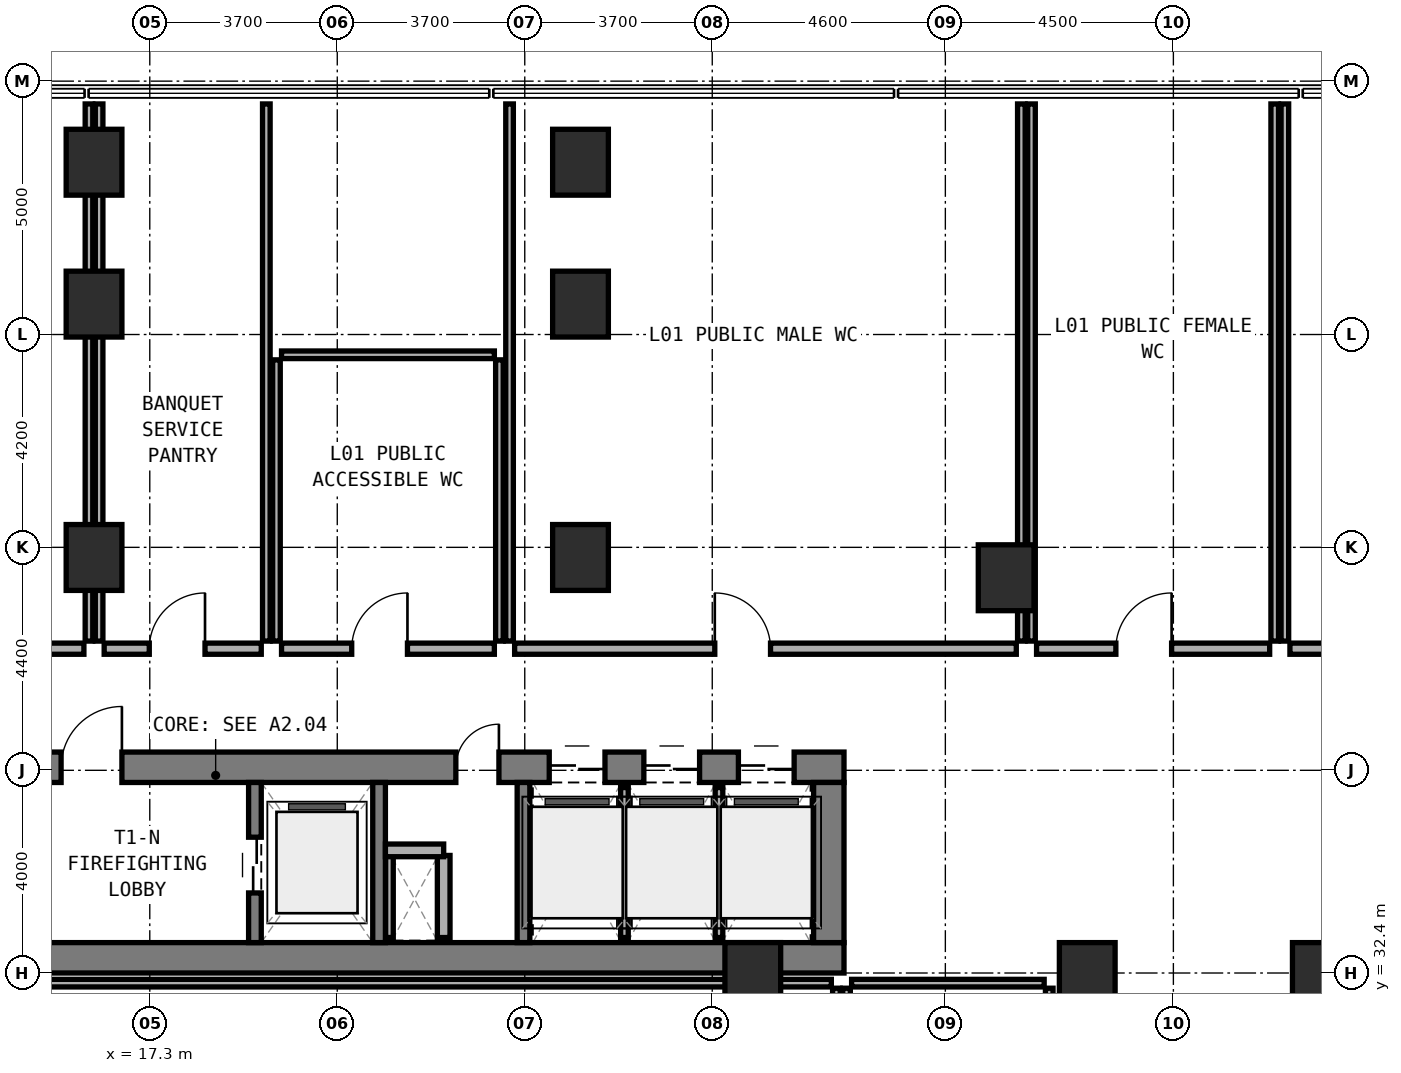
"""IFC4 building model, lengths in metres.
Left out: names, types, materials, properties, quantities, classifications, styles, units other than length and angle.
Written with IfcOpenShell. Run it as: python <this file> out.ifc"""

import sys

from ifc_helpers import new_model, si_unit, direction, frame, frame_2d, origin, origin_2d, place, context, subcontext, project, spatial, rectangle, extrude, element, fill, save


model = new_model("IFC4")
c1 = context("Model", 3, precision=1e-05, world=origin(), true_north=direction((0.0, 1.0)))
c2 = subcontext(c1, "Body", "Model", "MODEL_VIEW")
j1 = project(units=[si_unit("LENGTHUNIT", "METRE"), si_unit("PLANEANGLEUNIT", "RADIAN")], contexts=[c1])
p1 = place(None, origin())
s1 = spatial("IfcSite", under=j1, at=p1, CompositionType="ELEMENT")
p2 = place(p1, origin())
s2 = spatial("IfcBuilding", under=s1, at=p2, CompositionType="ELEMENT")
p3 = place(p2, frame((0.0, 0.0, 5.4)))
s3 = spatial("IfcBuildingStorey", under=s2, at=p3, CompositionType="ELEMENT", Elevation=5.4)
p4 = place(p3, frame((6.2, 32.7, 0.0), z_axis=(0.0, 0.0, 1.0), x_axis=(1.0, 0.0, 0.0)))
e1 = element("IfcWall", 1, at=p4, inside=s3, PredefinedType="SHEAR", context=c2, shape_type="SweptSolid", body=[
    extrude(rectangle(XDim=24.8, YDim=0.6, at=frame_2d((12.4, 0.0))), origin(), (0.0, 0.0, 1.0), 4.8),
])
p5 = place(p3, frame((6.2, 36.46, 0.0), z_axis=(0.0, 0.0, 1.0), x_axis=(1.0, 0.0, 0.0)))
e2 = element("IfcWall", 2, at=p5, inside=s3, PredefinedType="SHEAR", context=c2, shape_type="SweptSolid", body=[
    extrude(rectangle(XDim=24.8, YDim=0.6, at=frame_2d((12.4, 0.0))), origin(), (0.0, 0.0, 1.0), 4.8),
])
p6 = place(p5, frame((9.35, 0.0, 0.0)))
e3 = element("IfcOpeningElement", 3, at=p6, cuts=e2, PredefinedType="OPENING", context=c2, shape_type="SweptSolid", body=[
    extrude(rectangle(XDim=1.2, YDim=2.15, at=frame_2d((0.6, 1.075))), frame((0.0, 0.31, 0.0), z_axis=(0.0, -1.0, 0.0), x_axis=(1.0, 0.0, 0.0)), (0.0, 0.0, 1.0), 0.62),
])
p7 = place(p5, frame((17.14, 0.0, 0.0)))
e4 = element("IfcOpeningElement", 4, at=p7, cuts=e2, PredefinedType="OPENING", context=c2, shape_type="SweptSolid", body=[
    extrude(rectangle(XDim=0.85, YDim=2.1, at=frame_2d((0.425, 1.05))), frame((0.0, 0.31, 0.0), z_axis=(0.0, -1.0, 0.0), x_axis=(1.0, 0.0, 0.0)), (0.0, 0.0, 1.0), 0.62),
])
p8 = place(p5, frame((18.983, 0.0, 0.0)))
e5 = element("IfcOpeningElement", 5, at=p8, cuts=e2, PredefinedType="OPENING", context=c2, shape_type="SweptSolid", body=[
    extrude(rectangle(XDim=1.1, YDim=2.15, at=frame_2d((0.55, 1.075))), frame((0.0, 0.31, 0.0), z_axis=(0.0, -1.0, 0.0), x_axis=(1.0, 0.0, 0.0)), (0.0, 0.0, 1.0), 0.62),
])
p9 = place(p5, frame((20.85, 0.0, 0.0)))
e6 = element("IfcOpeningElement", 6, at=p9, cuts=e2, PredefinedType="OPENING", context=c2, shape_type="SweptSolid", body=[
    extrude(rectangle(XDim=1.1, YDim=2.15, at=frame_2d((0.55, 1.075))), frame((0.0, 0.31, 0.0), z_axis=(0.0, -1.0, 0.0), x_axis=(1.0, 0.0, 0.0)), (0.0, 0.0, 1.0), 0.62),
])
p10 = place(p5, frame((22.716, 0.0, 0.0)))
e7 = element("IfcOpeningElement", 7, at=p10, cuts=e2, PredefinedType="OPENING", context=c2, shape_type="SweptSolid", body=[
    extrude(rectangle(XDim=1.1, YDim=2.15, at=frame_2d((0.55, 1.075))), frame((0.0, 0.31, 0.0), z_axis=(0.0, -1.0, 0.0), x_axis=(1.0, 0.0, 0.0)), (0.0, 0.0, 1.0), 0.62),
])
p11 = place(p3, frame((30.7, 33.0, 0.0), z_axis=(0.0, 0.0, 1.0), x_axis=(0.0, 1.0, 0.0)))
e8 = element("IfcWall", 8, at=p11, inside=s3, PredefinedType="SHEAR", context=c2, shape_type="SweptSolid", body=[
    extrude(rectangle(XDim=3.16, YDim=0.6, at=frame_2d((1.58, 0.0))), origin(), (0.0, 0.0, 1.0), 4.8),
])
p12 = place(p3, frame((19.375, 33.0, 0.0), z_axis=(0.0, 0.0, 1.0), x_axis=(0.0, 1.0, 0.0)))
e9 = element("IfcWall", 9, at=p12, inside=s3, PredefinedType="STANDARD", context=c2, shape_type="SweptSolid", body=[
    extrude(rectangle(XDim=3.16, YDim=0.25, at=frame_2d((1.58, 0.0))), origin(), (0.0, 0.0, 1.0), 4.45),
])
p13 = place(p12, frame((0.98, 0.0, 0.0)))
e10 = element("IfcOpeningElement", 10, at=p13, cuts=e9, PredefinedType="OPENING", context=c2, shape_type="SweptSolid", body=[
    extrude(rectangle(XDim=1.1, YDim=2.15, at=frame_2d((0.55, 1.075))), frame((0.0, 0.135, 0.0), z_axis=(0.0, -1.0, 0.0), x_axis=(1.0, 0.0, 0.0)), (0.0, 0.0, 1.0), 0.27),
])
for number, where, z_axis, x_axis in (
    (11, (21.825, 33.0, 0.0), (0.0, 0.0, 1.0), (0.0, 1.0, 0.0)),
    (12, (24.675, 33.0, 0.0), (0.0, 0.0, 1.0), (0.0, 1.0, 0.0)),
):
    element("IfcWall", number, at=place(p3, frame(where, z_axis=z_axis, x_axis=x_axis)), inside=s3, PredefinedType="STANDARD", context=c2, shape_type="SweptSolid", body=[
        extrude(rectangle(XDim=3.16, YDim=0.25, at=frame_2d((1.58, 0.0))), origin(), (0.0, 0.0, 1.0), 4.45),
    ])
for number, where, z_axis, x_axis in (
    (13, (16.2, 40.6, 0.0), (0.0, 0.0, 1.0), (1.0, 0.0, 0.0)),
    (14, (25.8, 40.6, 0.0), (0.0, 0.0, 1.0), (1.0, 0.0, 0.0)),
    (15, (34.2, 40.2, 0.0), (0.0, 0.0, 1.0), (1.0, 0.0, 0.0)),
    (16, (35.8, 32.35, 0.0), (0.0, 0.0, 1.0), (1.0, 0.0, 0.0)),
    (17, (29.2, 32.35, 0.0), (0.0, 0.0, 1.0), (1.0, 0.0, 0.0)),
    (18, (40.4, 32.35, 0.0), (0.0, 0.0, 1.0), (1.0, 0.0, 0.0)),
    (19, (16.2, 48.4, 0.0), (0.0, 0.0, 1.0), (1.0, 0.0, 0.0)),
    (20, (25.8, 48.4, 0.0), (0.0, 0.0, 1.0), (1.0, 0.0, 0.0)),
    (21, (16.2, 45.6, 0.0), (0.0, 0.0, 1.0), (1.0, 0.0, 0.0)),
    (22, (25.8, 45.6, 0.0), (0.0, 0.0, 1.0), (1.0, 0.0, 0.0)),
):
    element("IfcColumn", number, at=place(p3, frame(where, z_axis=z_axis, x_axis=x_axis)), inside=s3, PredefinedType="COLUMN", context=c2, shape_type="SweptSolid", body=[
        extrude(rectangle(XDim=1.1, YDim=1.3, at=origin_2d()), origin(), (0.0, 0.0, 1.0), 4.8),
    ])
p14 = place(p3, frame((22.03, 33.1, 0.0), z_axis=(0.0, 0.0, 1.0), x_axis=(0.0, 1.0, 0.0)))
e23 = element("IfcWall", 23, at=p14, inside=s3, PredefinedType="PARTITIONING", context=c2, shape_type="SweptSolid", body=[
    extrude(rectangle(XDim=1.62, YDim=0.15, at=frame_2d((0.81, 0.0))), origin(), (0.0, 0.0, 1.0), 4.45),
])
p15 = place(p3, frame((23.1, 33.1, 0.0), z_axis=(0.0, 0.0, 1.0), x_axis=(0.0, 1.0, 0.0)))
e24 = element("IfcWall", 24, at=p15, inside=s3, PredefinedType="SOLIDWALL", context=c2, shape_type="SweptSolid", body=[
    extrude(rectangle(XDim=1.62, YDim=0.25, at=frame_2d((0.81, 0.0))), origin(), (0.0, 0.0, 1.0), 4.45),
])
p16 = place(p3, frame((21.95, 34.82, 0.0), z_axis=(0.0, 0.0, 1.0), x_axis=(1.0, 0.0, 0.0)))
e25 = element("IfcWall", 25, at=p16, inside=s3, PredefinedType="SOLIDWALL", context=c2, shape_type="SweptSolid", body=[
    extrude(rectangle(XDim=1.15, YDim=0.25, at=frame_2d((0.575, 0.0))), origin(), (0.0, 0.0, 1.0), 4.45),
])
p17 = place(p3, frame((26.667, 33.1, 0.0), z_axis=(0.0, 0.0, 1.0), x_axis=(0.0, 1.0, 0.0)))
e26 = element("IfcWall", 26, at=p17, inside=s3, PredefinedType="PARTITIONING", context=c2, shape_type="SweptSolid", body=[
    extrude(rectangle(XDim=2.96, YDim=0.15, at=frame_2d((1.48, 0.0))), origin(), (0.0, 0.0, 1.0), 4.45),
])
p18 = place(p3, frame((28.533, 33.1, 0.0), z_axis=(0.0, 0.0, 1.0), x_axis=(0.0, 1.0, 0.0)))
e27 = element("IfcWall", 27, at=p18, inside=s3, PredefinedType="PARTITIONING", context=c2, shape_type="SweptSolid", body=[
    extrude(rectangle(XDim=2.96, YDim=0.15, at=frame_2d((1.48, 0.0))), origin(), (0.0, 0.0, 1.0), 3.525),
])
p19 = place(p3, frame((30.85, 17.9, 0.0), z_axis=(0.0, 0.0, 1.0), x_axis=(0.0, 1.0, 0.0)))
e28 = element("IfcWall", 28, at=p19, inside=s3, PredefinedType="PARTITIONING", context=c2, shape_type="SweptSolid", body=[
    extrude(rectangle(XDim=14.2, YDim=0.15, at=frame_2d((7.1, 0.0))), origin(), (0.0, 0.0, 1.0), 3.425),
])
p20 = place(p3, frame((11.9, 32.2, 0.0), z_axis=(0.0, 0.0, 1.0), x_axis=(1.0, 0.0, 0.0)))
e29 = element("IfcWall", 29, at=p20, inside=s3, PredefinedType="PARTITIONING", context=c2, shape_type="SweptSolid", body=[
    extrude(rectangle(XDim=18.85, YDim=0.15, at=frame_2d((9.425, 0.0))), origin(), (0.0, 0.0, 1.0), 3.525),
])
for number, where, z_axis, x_axis in (
    (30, (31.05, 13.5, 0.0), (0.0, 0.0, 1.0), (0.0, 1.0, 0.0)),
    (31, (35.05, 13.5, 0.0), (0.0, 0.0, 1.0), (0.0, 1.0, 0.0)),
):
    element("IfcWall", number, at=place(p3, frame(where, z_axis=z_axis, x_axis=x_axis)), inside=s3, PredefinedType="PARTITIONING", context=c2, shape_type="SweptSolid", body=[
        extrude(rectangle(XDim=18.6, YDim=0.15, at=frame_2d((9.3, 0.0))), origin(), (0.0, 0.0, 1.0), 3.425),
    ])
p21 = place(p3, frame((31.15, 32.2, 0.0), z_axis=(0.0, 0.0, 1.0), x_axis=(1.0, 0.0, 0.0)))
e32 = element("IfcWall", 32, at=p21, inside=s3, PredefinedType="PARTITIONING", context=c2, shape_type="SweptSolid", body=[
    extrude(rectangle(XDim=3.8, YDim=0.15, at=frame_2d((1.9, 0.0))), origin(), (0.0, 0.0, 1.0), 3.525),
])
for number, where, z_axis, x_axis in (
    (33, (16.3, 38.95, 0.0), (0.0, 0.0, 1.0), (0.0, 1.0, 0.0)),
    (34, (19.6, 38.95, 0.0), (0.0, 0.0, 1.0), (0.0, 1.0, 0.0)),
):
    element("IfcWall", number, at=place(p3, frame(where, z_axis=z_axis, x_axis=x_axis)), inside=s3, PredefinedType="PARTITIONING", context=c2, shape_type="SweptSolid", body=[
        extrude(rectangle(XDim=10.6, YDim=0.15, at=frame_2d((5.3, 0.0))), origin(), (0.0, 0.0, 1.0), 3.825),
    ])
p22 = place(p3, frame((16.4, 38.8, 0.0), z_axis=(0.0, 0.0, 1.0), x_axis=(1.0, 0.0, 0.0)))
e35 = element("IfcWall", 35, at=p22, inside=s3, PredefinedType="SOLIDWALL", context=c2, shape_type="SweptSolid", body=[
    extrude(rectangle(XDim=3.1, YDim=0.22, at=frame_2d((1.55, 0.0))), origin(), (0.0, 0.0, 1.0), 4.45),
])
p23 = place(p22, frame((0.89, 0.0, 0.0)))
e36 = element("IfcOpeningElement", 36, at=p23, cuts=e35, PredefinedType="OPENING", context=c2, shape_type="SweptSolid", body=[
    extrude(rectangle(XDim=1.1, YDim=2.1, at=frame_2d((0.55, 1.05))), frame((0.0, 0.12, 0.0), z_axis=(0.0, -1.0, 0.0), x_axis=(1.0, 0.0, 0.0)), (0.0, 0.0, 1.0), 0.24),
])
p24 = place(p3, frame((16.1, 38.95, 0.0), z_axis=(0.0, 0.0, 1.0), x_axis=(0.0, 1.0, 0.0)))
e37 = element("IfcWall", 37, at=p24, inside=s3, PredefinedType="PARTITIONING", context=c2, shape_type="SweptSolid", body=[
    extrude(rectangle(XDim=10.6, YDim=0.15, at=frame_2d((5.3, 0.0))), origin(), (0.0, 0.0, 1.0), 3.625),
])
p25 = place(p3, frame((10.7, 38.8, 0.0), z_axis=(0.0, 0.0, 1.0), x_axis=(1.0, 0.0, 0.0)))
e38 = element("IfcWall", 38, at=p25, inside=s3, PredefinedType="SOLIDWALL", context=c2, shape_type="SweptSolid", body=[
    extrude(rectangle(XDim=5.3, YDim=0.22, at=frame_2d((2.65, 0.0))), origin(), (0.0, 0.0, 1.0), 4.45),
])
p26 = place(p25, frame((1.88, 0.0, 0.0)))
e39 = element("IfcOpeningElement", 39, at=p26, cuts=e38, PredefinedType="OPENING", context=c2, shape_type="SweptSolid", body=[
    extrude(rectangle(XDim=1.1, YDim=2.1, at=frame_2d((0.55, 1.05))), frame((0.0, 0.12, 0.0), z_axis=(0.0, -1.0, 0.0), x_axis=(1.0, 0.0, 0.0)), (0.0, 0.0, 1.0), 0.24),
])
for number, where, z_axis, x_axis in (
    (40, (19.8, 38.95, 0.0), (0.0, 0.0, 1.0), (0.0, 1.0, 0.0)),
    (41, (24.2, 38.95, 0.0), (0.0, 0.0, 1.0), (0.0, 1.0, 0.0)),
):
    element("IfcWall", number, at=place(p3, frame(where, z_axis=z_axis, x_axis=x_axis)), inside=s3, PredefinedType="PARTITIONING", context=c2, shape_type="SweptSolid", body=[
        extrude(rectangle(XDim=5.55, YDim=0.15, at=frame_2d((2.775, 0.0))), origin(), (0.0, 0.0, 1.0), 3.975),
    ])
p27 = place(p3, frame((19.9, 44.6, 0.0), z_axis=(0.0, 0.0, 1.0), x_axis=(1.0, 0.0, 0.0)))
e42 = element("IfcWall", 42, at=p27, inside=s3, PredefinedType="PARTITIONING", context=c2, shape_type="SweptSolid", body=[
    extrude(rectangle(XDim=4.2, YDim=0.15, at=frame_2d((2.1, 0.0))), origin(), (0.0, 0.0, 1.0), 4.45),
])
p28 = place(p3, frame((19.9, 38.8, 0.0), z_axis=(0.0, 0.0, 1.0), x_axis=(1.0, 0.0, 0.0)))
e43 = element("IfcWall", 43, at=p28, inside=s3, PredefinedType="SOLIDWALL", context=c2, shape_type="SweptSolid", body=[
    extrude(rectangle(XDim=4.2, YDim=0.22, at=frame_2d((2.1, 0.0))), origin(), (0.0, 0.0, 1.0), 4.45),
])
p29 = place(p28, frame((1.385, 0.0, 0.0)))
e44 = element("IfcOpeningElement", 44, at=p29, cuts=e43, PredefinedType="OPENING", context=c2, shape_type="SweptSolid", body=[
    extrude(rectangle(XDim=1.1, YDim=2.1, at=frame_2d((0.55, 1.05))), frame((0.0, 0.12, 0.0), z_axis=(0.0, -1.0, 0.0), x_axis=(1.0, 0.0, 0.0)), (0.0, 0.0, 1.0), 0.24),
])
p30 = place(p3, frame((24.4, 38.95, 0.0), z_axis=(0.0, 0.0, 1.0), x_axis=(0.0, 1.0, 0.0)))
e45 = element("IfcWall", 45, at=p30, inside=s3, PredefinedType="PARTITIONING", context=c2, shape_type="SweptSolid", body=[
    extrude(rectangle(XDim=10.6, YDim=0.15, at=frame_2d((5.3, 0.0))), origin(), (0.0, 0.0, 1.0), 3.825),
])
p31 = place(p3, frame((34.5, 38.95, 0.0), z_axis=(0.0, 0.0, 1.0), x_axis=(0.0, 1.0, 0.0)))
e46 = element("IfcWall", 46, at=p31, inside=s3, PredefinedType="PARTITIONING", context=c2, shape_type="SweptSolid", body=[
    extrude(rectangle(XDim=10.6, YDim=0.15, at=frame_2d((5.3, 0.0))), origin(), (0.0, 0.0, 1.0), 3.975),
])
p32 = place(p3, frame((24.5, 38.8, 0.0), z_axis=(0.0, 0.0, 1.0), x_axis=(1.0, 0.0, 0.0)))
e47 = element("IfcWall", 47, at=p32, inside=s3, PredefinedType="SOLIDWALL", context=c2, shape_type="SweptSolid", body=[
    extrude(rectangle(XDim=9.9, YDim=0.22, at=frame_2d((4.95, 0.0))), origin(), (0.0, 0.0, 1.0), 3.525),
])
p33 = place(p32, frame((3.95, 0.0, 0.0)))
e48 = element("IfcOpeningElement", 48, at=p33, cuts=e47, PredefinedType="OPENING", context=c2, shape_type="SweptSolid", body=[
    extrude(rectangle(XDim=1.1, YDim=2.1, at=frame_2d((0.55, 1.05))), frame((0.0, 0.12, 0.0), z_axis=(0.0, -1.0, 0.0), x_axis=(1.0, 0.0, 0.0)), (0.0, 0.0, 1.0), 0.24),
])
for number, where, z_axis, x_axis in (
    (49, (34.7, 38.95, 0.0), (0.0, 0.0, 1.0), (0.0, 1.0, 0.0)),
    (50, (39.5, 38.95, 0.0), (0.0, 0.0, 1.0), (0.0, 1.0, 0.0)),
):
    element("IfcWall", number, at=place(p3, frame(where, z_axis=z_axis, x_axis=x_axis)), inside=s3, PredefinedType="PARTITIONING", context=c2, shape_type="SweptSolid", body=[
        extrude(rectangle(XDim=10.6, YDim=0.15, at=frame_2d((5.3, 0.0))), origin(), (0.0, 0.0, 1.0), 4.45),
    ])
p34 = place(p3, frame((34.8, 38.8, 0.0), z_axis=(0.0, 0.0, 1.0), x_axis=(1.0, 0.0, 0.0)))
e51 = element("IfcWall", 51, at=p34, inside=s3, PredefinedType="SOLIDWALL", context=c2, shape_type="SweptSolid", body=[
    extrude(rectangle(XDim=4.6, YDim=0.22, at=frame_2d((2.3, 0.0))), origin(), (0.0, 0.0, 1.0), 4.45),
])
p35 = place(p34, frame((1.565, 0.0, 0.0)))
e52 = element("IfcOpeningElement", 52, at=p35, cuts=e51, PredefinedType="OPENING", context=c2, shape_type="SweptSolid", body=[
    extrude(rectangle(XDim=1.1, YDim=2.1, at=frame_2d((0.55, 1.05))), frame((0.0, 0.12, 0.0), z_axis=(0.0, -1.0, 0.0), x_axis=(1.0, 0.0, 0.0)), (0.0, 0.0, 1.0), 0.24),
])
p36 = place(p3, frame((39.7, 38.95, 0.0), z_axis=(0.0, 0.0, 1.0), x_axis=(0.0, 1.0, 0.0)))
e53 = element("IfcWall", 53, at=p36, inside=s3, PredefinedType="PARTITIONING", context=c2, shape_type="SweptSolid", body=[
    extrude(rectangle(XDim=10.6, YDim=0.15, at=frame_2d((5.3, 0.0))), origin(), (0.0, 0.0, 1.0), 4.45),
])
p37 = place(p3, frame((39.8, 38.8, 0.0), z_axis=(0.0, 0.0, 1.0), x_axis=(1.0, 0.0, 0.0)))
e54 = element("IfcWall", 54, at=p37, inside=s3, PredefinedType="SOLIDWALL", context=c2, shape_type="SweptSolid", body=[
    extrude(rectangle(XDim=17.6, YDim=0.22, at=frame_2d((8.8, 0.0))), origin(), (0.0, 0.0, 1.0), 3.725),
])
p38 = place(p37, frame((7.415, 0.0, 0.0)))
e55 = element("IfcOpeningElement", 55, at=p38, cuts=e54, PredefinedType="OPENING", context=c2, shape_type="SweptSolid", body=[
    extrude(rectangle(XDim=1.1, YDim=2.1, at=frame_2d((0.55, 1.05))), frame((0.0, 0.12, 0.0), z_axis=(0.0, -1.0, 0.0), x_axis=(1.0, 0.0, 0.0)), (0.0, 0.0, 1.0), 0.24),
])
p39 = place(p6, origin())
e56 = element("IfcDoor", 56, at=p39, inside=s3, OperationType="SINGLE_SWING_RIGHT", PredefinedType="DOOR", context=c2, shape_type="SweptSolid", body=[
    extrude(rectangle(XDim=1.2, YDim=2.15, at=frame_2d((0.6, 1.075))), frame((0.0, 0.025, 0.0), z_axis=(0.0, -1.0, 0.0), x_axis=(1.0, 0.0, 0.0)), (0.0, 0.0, 1.0), 0.05),
])
fill(e3, e56)
p40 = place(p13, origin())
e57 = element("IfcDoor", 57, at=p40, inside=s3, OperationType="DOUBLE_DOOR_SLIDING", PredefinedType="DOOR", context=c2, shape_type="SweptSolid", body=[
    extrude(rectangle(XDim=1.1, YDim=2.15, at=frame_2d((0.55, 1.075))), frame((0.0, 0.025, 0.0), z_axis=(0.0, -1.0, 0.0), x_axis=(1.0, 0.0, 0.0)), (0.0, 0.0, 1.0), 0.05),
])
fill(e10, e57)
p41 = place(p7, origin())
e58 = element("IfcDoor", 58, at=p41, inside=s3, OperationType="SINGLE_SWING_RIGHT", PredefinedType="DOOR", context=c2, shape_type="SweptSolid", body=[
    extrude(rectangle(XDim=0.85, YDim=2.1, at=frame_2d((0.425, 1.05))), frame((0.0, 0.025, 0.0), z_axis=(0.0, -1.0, 0.0), x_axis=(1.0, 0.0, 0.0)), (0.0, 0.0, 1.0), 0.05),
])
fill(e4, e58)
p42 = place(p8, origin())
e59 = element("IfcDoor", 59, at=p42, inside=s3, OperationType="DOUBLE_DOOR_SLIDING", PredefinedType="DOOR", context=c2, shape_type="SweptSolid", body=[
    extrude(rectangle(XDim=1.1, YDim=2.15, at=frame_2d((0.55, 1.075))), frame((0.0, 0.025, 0.0), z_axis=(0.0, -1.0, 0.0), x_axis=(1.0, 0.0, 0.0)), (0.0, 0.0, 1.0), 0.05),
])
fill(e5, e59)
p43 = place(p9, origin())
e60 = element("IfcDoor", 60, at=p43, inside=s3, OperationType="DOUBLE_DOOR_SLIDING", PredefinedType="DOOR", context=c2, shape_type="SweptSolid", body=[
    extrude(rectangle(XDim=1.1, YDim=2.15, at=frame_2d((0.55, 1.075))), frame((0.0, 0.025, 0.0), z_axis=(0.0, -1.0, 0.0), x_axis=(1.0, 0.0, 0.0)), (0.0, 0.0, 1.0), 0.05),
])
fill(e6, e60)
p44 = place(p10, origin())
e61 = element("IfcDoor", 61, at=p44, inside=s3, OperationType="DOUBLE_DOOR_SLIDING", PredefinedType="DOOR", context=c2, shape_type="SweptSolid", body=[
    extrude(rectangle(XDim=1.1, YDim=2.15, at=frame_2d((0.55, 1.075))), frame((0.0, 0.025, 0.0), z_axis=(0.0, -1.0, 0.0), x_axis=(1.0, 0.0, 0.0)), (0.0, 0.0, 1.0), 0.05),
])
fill(e7, e61)
p45 = place(p23, origin())
e62 = element("IfcDoor", 62, at=p45, inside=s3, OperationType="SINGLE_SWING_RIGHT", PredefinedType="DOOR", context=c2, shape_type="SweptSolid", body=[
    extrude(rectangle(XDim=1.1, YDim=2.1, at=frame_2d((0.55, 1.05))), frame((0.0, 0.025, 0.0), z_axis=(0.0, -1.0, 0.0), x_axis=(1.0, 0.0, 0.0)), (0.0, 0.0, 1.0), 0.05),
])
fill(e36, e62)
p46 = place(p29, origin())
e63 = element("IfcDoor", 63, at=p46, inside=s3, OperationType="SINGLE_SWING_RIGHT", PredefinedType="DOOR", context=c2, shape_type="SweptSolid", body=[
    extrude(rectangle(XDim=1.1, YDim=2.1, at=frame_2d((0.55, 1.05))), frame((0.0, 0.025, 0.0), z_axis=(0.0, -1.0, 0.0), x_axis=(1.0, 0.0, 0.0)), (0.0, 0.0, 1.0), 0.05),
])
fill(e44, e63)
p47 = place(p33, origin())
e64 = element("IfcDoor", 64, at=p47, inside=s3, OperationType="SINGLE_SWING_LEFT", PredefinedType="DOOR", context=c2, shape_type="SweptSolid", body=[
    extrude(rectangle(XDim=1.1, YDim=2.1, at=frame_2d((0.55, 1.05))), frame((0.0, 0.025, 0.0), z_axis=(0.0, -1.0, 0.0), x_axis=(1.0, 0.0, 0.0)), (0.0, 0.0, 1.0), 0.05),
])
fill(e48, e64)
p48 = place(p35, origin())
e65 = element("IfcDoor", 65, at=p48, inside=s3, OperationType="SINGLE_SWING_RIGHT", PredefinedType="DOOR", context=c2, shape_type="SweptSolid", body=[
    extrude(rectangle(XDim=1.1, YDim=2.1, at=frame_2d((0.55, 1.05))), frame((0.0, 0.025, 0.0), z_axis=(0.0, -1.0, 0.0), x_axis=(1.0, 0.0, 0.0)), (0.0, 0.0, 1.0), 0.05),
])
fill(e52, e65)
save(model, sys.argv[1])
